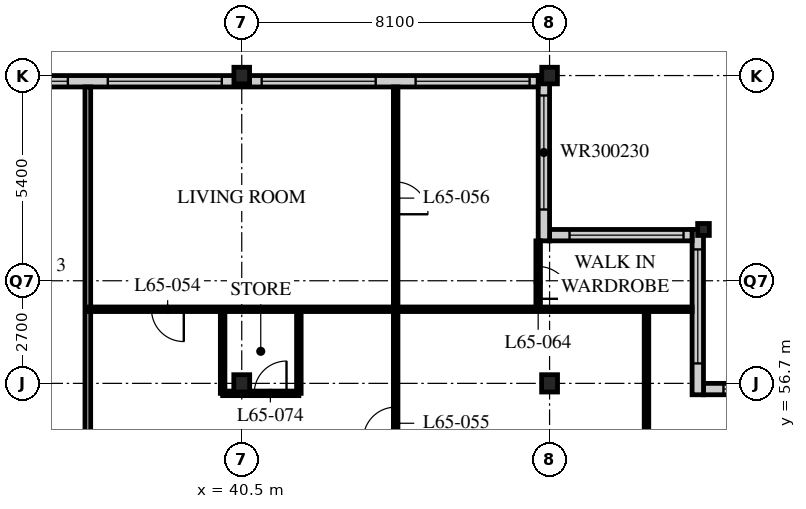
"""IFC4 building model, lengths in metres.
Left out: names, types, materials, properties, quantities, classifications, styles, units other than length and angle.
Written with IfcOpenShell. Run it as: python <this file> out.ifc"""

import sys

from ifc_helpers import new_model, si_unit, direction, frame, frame_2d, origin, origin_2d, place, context, subcontext, project, spatial, rectangle, i_section, extrude, element, fill, save


model = new_model("IFC4")
c1 = context("Model", 3, precision=1e-05, world=origin(), true_north=direction((0.0, 1.0)))
c2 = subcontext(c1, "Body", "Model", "MODEL_VIEW")
j1 = project(units=[si_unit("LENGTHUNIT", "METRE"), si_unit("PLANEANGLEUNIT", "RADIAN")], contexts=[c1])
p1 = place(None, origin())
s1 = spatial("IfcSite", under=j1, at=p1, CompositionType="ELEMENT")
p2 = place(p1, origin())
s2 = spatial("IfcBuilding", under=s1, at=p2, CompositionType="ELEMENT")
p3 = place(p2, frame((0.0, 0.0, 254.1)))
s3 = spatial("IfcBuildingStorey", under=s2, at=p3, CompositionType="ELEMENT", Elevation=254.1)
p4 = place(p3, frame((40.5, 56.7, 0.0), z_axis=(0.0, 0.0, 1.0), x_axis=(1.0, 0.0, 0.0)))
e1 = element("IfcColumn", 1, at=p4, inside=s3, PredefinedType="COLUMN", context=c2, shape_type="SweptSolid", body=[
    extrude(i_section(OverallWidth=0.418, OverallDepth=0.456, WebThickness=0.042, FlangeThickness=0.067, FilletRadius=0.015, at=origin_2d()), origin(), (0.0, 0.0, 1.0), 3.9),
])
p5 = place(p3, frame((40.5, 64.8, 0.0), z_axis=(0.0, 0.0, 1.0), x_axis=(1.0, 0.0, 0.0)))
e2 = element("IfcColumn", 2, at=p5, inside=s3, PredefinedType="COLUMN", context=c2, shape_type="SweptSolid", body=[
    extrude(i_section(OverallWidth=0.412, OverallDepth=0.437, WebThickness=0.036, FlangeThickness=0.058, FilletRadius=0.015, at=origin_2d()), origin(), (0.0, 0.0, 1.0), 3.9),
])
p6 = place(p3, frame((48.6, 56.7, 0.0), z_axis=(0.0, 0.0, 1.0), x_axis=(1.0, 0.0, 0.0)))
e3 = element("IfcColumn", 3, at=p6, inside=s3, PredefinedType="COLUMN", context=c2, shape_type="SweptSolid", body=[
    extrude(i_section(OverallWidth=0.418, OverallDepth=0.456, WebThickness=0.042, FlangeThickness=0.067, FilletRadius=0.015, at=origin_2d()), origin(), (0.0, 0.0, 1.0), 3.9),
])
p7 = place(p3, frame((48.6, 64.8, 0.0), z_axis=(0.0, 0.0, 1.0), x_axis=(1.0, 0.0, 0.0)))
e4 = element("IfcColumn", 4, at=p7, inside=s3, PredefinedType="COLUMN", context=c2, shape_type="SweptSolid", body=[
    extrude(i_section(OverallWidth=0.412, OverallDepth=0.437, WebThickness=0.036, FlangeThickness=0.058, FilletRadius=0.015, at=origin_2d()), origin(), (0.0, 0.0, 1.0), 3.9),
])
p8 = place(p3, frame((52.65, 60.75, 0.0), z_axis=(0.0, 0.0, 1.0), x_axis=(1.0, 0.0, 0.0)))
e5 = element("IfcColumn", 5, at=p8, inside=s3, PredefinedType="COLUMN", context=c2, shape_type="SweptSolid", body=[
    extrude(i_section(OverallWidth=0.307, OverallDepth=0.314, WebThickness=0.012, FlangeThickness=0.019, FilletRadius=0.015, at=origin_2d()), origin(), (0.0, 0.0, 1.0), 3.9),
])
p9 = place(p3, frame((56.4, 56.55, 0.0), z_axis=(0.0, 0.0, 1.0), x_axis=(-1.0, 0.0, 0.0)))
e6 = element("IfcWall", 6, at=p9, inside=s3, PredefinedType="SOLIDWALL", context=c2, shape_type="SweptSolid", body=[
    extrude(rectangle(XDim=3.75, YDim=0.3, at=frame_2d((1.875, 0.0))), origin(), (0.0, 0.0, 1.0), 3.69),
])
p10 = place(p9, frame((0.225, 0.0, 0.6)))
e7 = element("IfcOpeningElement", 7, at=p10, cuts=e6, PredefinedType="OPENING", context=c2, shape_type="SweptSolid", body=[
    extrude(rectangle(XDim=3.0, YDim=2.3, at=frame_2d((1.5, 1.15))), frame((0.0, 0.16, 0.0), z_axis=(0.0, -1.0, 0.0), x_axis=(1.0, 0.0, 0.0)), (0.0, 0.0, 1.0), 0.32),
])
p11 = place(p3, frame((52.5, 56.4, 0.0), z_axis=(0.0, 0.0, 1.0), x_axis=(0.0, 1.0, 0.0)))
e8 = element("IfcWall", 8, at=p11, inside=s3, PredefinedType="SOLIDWALL", context=c2, shape_type="SweptSolid", body=[
    extrude(rectangle(XDim=4.35, YDim=0.3, at=frame_2d((2.175, 0.0))), origin(), (0.0, 0.0, 1.0), 3.69),
])
p12 = place(p11, frame((0.825, 0.0, 0.6)))
e9 = element("IfcOpeningElement", 9, at=p12, cuts=e8, PredefinedType="OPENING", context=c2, shape_type="SweptSolid", body=[
    extrude(rectangle(XDim=3.0, YDim=2.3, at=frame_2d((1.5, 1.15))), frame((0.0, 0.16, 0.0), z_axis=(0.0, -1.0, 0.0), x_axis=(1.0, 0.0, 0.0)), (0.0, 0.0, 1.0), 0.32),
])
p13 = place(p3, frame((52.35, 60.6, 0.0), z_axis=(0.0, 0.0, 1.0), x_axis=(-1.0, 0.0, 0.0)))
e10 = element("IfcWall", 10, at=p13, inside=s3, PredefinedType="SOLIDWALL", context=c2, shape_type="SweptSolid", body=[
    extrude(rectangle(XDim=3.75, YDim=0.3, at=frame_2d((1.875, 0.0))), origin(), (0.0, 0.0, 1.0), 3.69),
])
p14 = place(p13, frame((0.225, 0.0, 0.6)))
e11 = element("IfcOpeningElement", 11, at=p14, cuts=e10, PredefinedType="OPENING", context=c2, shape_type="SweptSolid", body=[
    extrude(rectangle(XDim=3.0, YDim=2.3, at=frame_2d((1.5, 1.15))), frame((0.0, 0.16, 0.0), z_axis=(0.0, -1.0, 0.0), x_axis=(1.0, 0.0, 0.0)), (0.0, 0.0, 1.0), 0.32),
])
p15 = place(p3, frame((48.45, 60.45, 0.0), z_axis=(0.0, 0.0, 1.0), x_axis=(0.0, 1.0, 0.0)))
e12 = element("IfcWall", 12, at=p15, inside=s3, PredefinedType="SOLIDWALL", context=c2, shape_type="SweptSolid", body=[
    extrude(rectangle(XDim=4.35, YDim=0.3, at=frame_2d((2.175, 0.0))), origin(), (0.0, 0.0, 1.0), 3.69),
])
p16 = place(p15, frame((0.825, 0.0, 0.6)))
e13 = element("IfcOpeningElement", 13, at=p16, cuts=e12, PredefinedType="OPENING", context=c2, shape_type="SweptSolid", body=[
    extrude(rectangle(XDim=3.0, YDim=2.3, at=frame_2d((1.5, 1.15))), frame((0.0, 0.16, 0.0), z_axis=(0.0, -1.0, 0.0), x_axis=(1.0, 0.0, 0.0)), (0.0, 0.0, 1.0), 0.32),
])
p17 = place(p3, frame((48.3, 64.65, 0.0), z_axis=(0.0, 0.0, 1.0), x_axis=(-1.0, 0.0, 0.0)))
e14 = element("IfcWall", 14, at=p17, inside=s3, PredefinedType="SOLIDWALL", context=c2, shape_type="SweptSolid", body=[
    extrude(rectangle(XDim=40.2, YDim=0.3, at=frame_2d((20.1, 0.0))), origin(), (0.0, 0.0, 1.0), 3.69),
])
p18 = place(p17, frame((0.225, 0.0, 0.6)))
e15 = element("IfcOpeningElement", 15, at=p18, cuts=e14, PredefinedType="OPENING", context=c2, shape_type="SweptSolid", body=[
    extrude(rectangle(XDim=3.0, YDim=2.4, at=frame_2d((1.5, 1.2))), frame((0.0, 0.16, 0.0), z_axis=(0.0, -1.0, 0.0), x_axis=(1.0, 0.0, 0.0)), (0.0, 0.0, 1.0), 0.32),
])
p19 = place(p17, frame((4.275, 0.0, 0.6)))
e16 = element("IfcOpeningElement", 16, at=p19, cuts=e14, PredefinedType="OPENING", context=c2, shape_type="SweptSolid", body=[
    extrude(rectangle(XDim=3.0, YDim=2.4, at=frame_2d((1.5, 1.2))), frame((0.0, 0.16, 0.0), z_axis=(0.0, -1.0, 0.0), x_axis=(1.0, 0.0, 0.0)), (0.0, 0.0, 1.0), 0.32),
])
p20 = place(p17, frame((8.325, 0.0, 0.6)))
e17 = element("IfcOpeningElement", 17, at=p20, cuts=e14, PredefinedType="OPENING", context=c2, shape_type="SweptSolid", body=[
    extrude(rectangle(XDim=3.0, YDim=2.4, at=frame_2d((1.5, 1.2))), frame((0.0, 0.16, 0.0), z_axis=(0.0, -1.0, 0.0), x_axis=(1.0, 0.0, 0.0)), (0.0, 0.0, 1.0), 0.32),
])
p21 = place(p17, frame((12.375, 0.0, 0.6)))
e18 = element("IfcOpeningElement", 18, at=p21, cuts=e14, PredefinedType="OPENING", context=c2, shape_type="SweptSolid", body=[
    extrude(rectangle(XDim=3.0, YDim=2.4, at=frame_2d((1.5, 1.2))), frame((0.0, 0.16, 0.0), z_axis=(0.0, -1.0, 0.0), x_axis=(1.0, 0.0, 0.0)), (0.0, 0.0, 1.0), 0.32),
])
p22 = place(p17, frame((16.425, 0.0, 0.6)))
e19 = element("IfcOpeningElement", 19, at=p22, cuts=e14, PredefinedType="OPENING", context=c2, shape_type="SweptSolid", body=[
    extrude(rectangle(XDim=3.0, YDim=2.4, at=frame_2d((1.5, 1.2))), frame((0.0, 0.16, 0.0), z_axis=(0.0, -1.0, 0.0), x_axis=(1.0, 0.0, 0.0)), (0.0, 0.0, 1.0), 0.32),
])
p23 = place(p17, frame((20.475, 0.0, 0.6)))
e20 = element("IfcOpeningElement", 20, at=p23, cuts=e14, PredefinedType="OPENING", context=c2, shape_type="SweptSolid", body=[
    extrude(rectangle(XDim=3.0, YDim=2.4, at=frame_2d((1.5, 1.2))), frame((0.0, 0.16, 0.0), z_axis=(0.0, -1.0, 0.0), x_axis=(1.0, 0.0, 0.0)), (0.0, 0.0, 1.0), 0.32),
])
p24 = place(p17, frame((24.525, 0.0, 0.6)))
e21 = element("IfcOpeningElement", 21, at=p24, cuts=e14, PredefinedType="OPENING", context=c2, shape_type="SweptSolid", body=[
    extrude(rectangle(XDim=3.0, YDim=2.4, at=frame_2d((1.5, 1.2))), frame((0.0, 0.16, 0.0), z_axis=(0.0, -1.0, 0.0), x_axis=(1.0, 0.0, 0.0)), (0.0, 0.0, 1.0), 0.32),
])
p25 = place(p17, frame((28.575, 0.0, 0.6)))
e22 = element("IfcOpeningElement", 22, at=p25, cuts=e14, PredefinedType="OPENING", context=c2, shape_type="SweptSolid", body=[
    extrude(rectangle(XDim=3.0, YDim=2.4, at=frame_2d((1.5, 1.2))), frame((0.0, 0.16, 0.0), z_axis=(0.0, -1.0, 0.0), x_axis=(1.0, 0.0, 0.0)), (0.0, 0.0, 1.0), 0.32),
])
p26 = place(p17, frame((32.625, 0.0, 0.6)))
e23 = element("IfcOpeningElement", 23, at=p26, cuts=e14, PredefinedType="OPENING", context=c2, shape_type="SweptSolid", body=[
    extrude(rectangle(XDim=3.0, YDim=2.4, at=frame_2d((1.5, 1.2))), frame((0.0, 0.16, 0.0), z_axis=(0.0, -1.0, 0.0), x_axis=(1.0, 0.0, 0.0)), (0.0, 0.0, 1.0), 0.32),
])
p27 = place(p17, frame((36.675, 0.0, 0.6)))
e24 = element("IfcOpeningElement", 24, at=p27, cuts=e14, PredefinedType="OPENING", context=c2, shape_type="SweptSolid", body=[
    extrude(rectangle(XDim=3.0, YDim=2.4, at=frame_2d((1.5, 1.2))), frame((0.0, 0.16, 0.0), z_axis=(0.0, -1.0, 0.0), x_axis=(1.0, 0.0, 0.0)), (0.0, 0.0, 1.0), 0.32),
])
p28 = place(p3, frame((36.45, 64.5, 0.0), z_axis=(0.0, 0.0, 1.0), x_axis=(0.0, -1.0, 0.0)))
e25 = element("IfcWall", 25, at=p28, inside=s3, PredefinedType="PARTITIONING", context=c2, shape_type="SweptSolid", body=[
    extrude(rectangle(XDim=11.85, YDim=0.15, at=frame_2d((5.925, 0.0))), origin(), (0.0, 0.0, 1.0), 3.69),
])
p29 = place(p3, frame((36.45, 58.65, 0.0), z_axis=(0.0, 0.0, 1.0), x_axis=(1.0, 0.0, 0.0)))
e26 = element("IfcWall", 26, at=p29, inside=s3, PredefinedType="PARTITIONING", context=c2, shape_type="SweptSolid", body=[
    extrude(rectangle(XDim=15.9, YDim=0.12, at=frame_2d((7.95, 0.0))), origin(), (0.0, 0.0, 1.0), 3.69),
])
p30 = place(p29, frame((1.675, 0.0, 0.0)))
e27 = element("IfcOpeningElement", 27, at=p30, cuts=e26, PredefinedType="OPENING", context=c2, shape_type="SweptSolid", body=[
    extrude(rectangle(XDim=0.85, YDim=2.1, at=frame_2d((0.425, 1.05))), frame((0.0, 0.07, 0.0), z_axis=(0.0, -1.0, 0.0), x_axis=(1.0, 0.0, 0.0)), (0.0, 0.0, 1.0), 0.14),
])
p31 = place(p3, frame((44.55, 64.5, 0.0), z_axis=(0.0, 0.0, 1.0), x_axis=(0.0, -1.0, 0.0)))
e28 = element("IfcWall", 28, at=p31, inside=s3, PredefinedType="PARTITIONING", context=c2, shape_type="SweptSolid", body=[
    extrude(rectangle(XDim=13.65, YDim=0.12, at=frame_2d((6.825, 0.0))), origin(), (0.0, 0.0, 1.0), 3.69),
])
p32 = place(p31, frame((8.425, 0.0, 0.0)))
e29 = element("IfcOpeningElement", 29, at=p32, cuts=e28, PredefinedType="OPENING", context=c2, shape_type="SweptSolid", body=[
    extrude(rectangle(XDim=0.85, YDim=2.1, at=frame_2d((0.425, 1.05))), frame((0.0, 0.07, 0.0), z_axis=(0.0, -1.0, 0.0), x_axis=(1.0, 0.0, 0.0)), (0.0, 0.0, 1.0), 0.14),
])
p33 = place(p31, frame((2.5, 0.0, 0.0)))
e30 = element("IfcOpeningElement", 30, at=p33, cuts=e28, PredefinedType="OPENING", context=c2, shape_type="SweptSolid", body=[
    extrude(rectangle(XDim=0.85, YDim=2.1, at=frame_2d((0.425, 1.05))), frame((0.0, 0.07, 0.0), z_axis=(0.0, -1.0, 0.0), x_axis=(1.0, 0.0, 0.0)), (0.0, 0.0, 1.0), 0.14),
])
p34 = place(p3, frame((48.3, 58.65, 0.0), z_axis=(0.0, 0.0, 1.0), x_axis=(0.0, 1.0, 0.0)))
e31 = element("IfcWall", 31, at=p34, inside=s3, PredefinedType="PARTITIONING", context=c2, shape_type="SweptSolid", body=[
    extrude(rectangle(XDim=1.8, YDim=0.12, at=frame_2d((0.9, 0.0))), origin(), (0.0, 0.0, 1.0), 3.69),
])
p35 = place(p34, frame((0.275, 0.0, 0.0)))
e32 = element("IfcOpeningElement", 32, at=p35, cuts=e31, PredefinedType="OPENING", context=c2, shape_type="SweptSolid", body=[
    extrude(rectangle(XDim=0.85, YDim=2.1, at=frame_2d((0.425, 1.05))), frame((0.0, 0.07, 0.0), z_axis=(0.0, -1.0, 0.0), x_axis=(1.0, 0.0, 0.0)), (0.0, 0.0, 1.0), 0.14),
])
p36 = place(p3, frame((51.15, 50.85, 0.0), z_axis=(0.0, 0.0, 1.0), x_axis=(0.0, 1.0, 0.0)))
e33 = element("IfcWall", 33, at=p36, inside=s3, PredefinedType="PARTITIONING", context=c2, shape_type="SweptSolid", body=[
    extrude(rectangle(XDim=7.8, YDim=0.12, at=frame_2d((3.9, 0.0))), origin(), (0.0, 0.0, 1.0), 3.69),
])
p37 = place(p36, frame((3.475, 0.0, 0.0)))
e34 = element("IfcOpeningElement", 34, at=p37, cuts=e33, PredefinedType="OPENING", context=c2, shape_type="SweptSolid", body=[
    extrude(rectangle(XDim=0.85, YDim=2.1, at=frame_2d((0.425, 1.05))), frame((0.0, 0.07, 0.0), z_axis=(0.0, -1.0, 0.0), x_axis=(1.0, 0.0, 0.0)), (0.0, 0.0, 1.0), 0.14),
])
for number, where, z_axis, x_axis in (
    (35, (39.997, 58.65, 0.0), (0.0, 0.0, 1.0), (0.0, -1.0, 0.0)),
    (36, (42.003, 58.65, 0.0), (0.0, 0.0, 1.0), (0.0, -1.0, 0.0)),
):
    element("IfcWall", number, at=place(p3, frame(where, z_axis=z_axis, x_axis=x_axis)), inside=s3, PredefinedType="PARTITIONING", context=c2, shape_type="SweptSolid", body=[
        extrude(rectangle(XDim=2.213, YDim=0.12, at=frame_2d((1.106, 0.0))), origin(), (0.0, 0.0, 1.0), 3.69),
    ])
p38 = place(p3, frame((39.997, 56.437, 0.0), z_axis=(0.0, 0.0, 1.0), x_axis=(1.0, 0.0, 0.0)))
e37 = element("IfcWall", 37, at=p38, inside=s3, PredefinedType="PARTITIONING", context=c2, shape_type="SweptSolid", body=[
    extrude(rectangle(XDim=2.006, YDim=0.12, at=frame_2d((1.003, 0.0))), origin(), (0.0, 0.0, 1.0), 3.69),
])
p39 = place(p38, frame((0.831, 0.0, 0.0)))
e38 = element("IfcOpeningElement", 38, at=p39, cuts=e37, PredefinedType="OPENING", context=c2, shape_type="SweptSolid", body=[
    extrude(rectangle(XDim=0.85, YDim=2.1, at=frame_2d((0.425, 1.05))), frame((0.0, 0.07, 0.0), z_axis=(0.0, -1.0, 0.0), x_axis=(1.0, 0.0, 0.0)), (0.0, 0.0, 1.0), 0.14),
])
p40 = place(p10, origin())
e39 = element("IfcWindow", 39, at=p40, inside=s3, PartitioningType="SINGLE_PANEL", PredefinedType="WINDOW", context=c2, shape_type="SweptSolid", body=[
    extrude(rectangle(XDim=3.0, YDim=2.3, at=frame_2d((1.5, 1.15))), frame((0.0, 0.03, 0.0), z_axis=(0.0, -1.0, 0.0), x_axis=(1.0, 0.0, 0.0)), (0.0, 0.0, 1.0), 0.06),
])
fill(e7, e39)
p41 = place(p12, origin())
e40 = element("IfcWindow", 40, at=p41, inside=s3, PartitioningType="SINGLE_PANEL", PredefinedType="WINDOW", context=c2, shape_type="SweptSolid", body=[
    extrude(rectangle(XDim=3.0, YDim=2.3, at=frame_2d((1.5, 1.15))), frame((0.0, 0.03, 0.0), z_axis=(0.0, -1.0, 0.0), x_axis=(1.0, 0.0, 0.0)), (0.0, 0.0, 1.0), 0.06),
])
fill(e9, e40)
p42 = place(p14, origin())
e41 = element("IfcWindow", 41, at=p42, inside=s3, PartitioningType="SINGLE_PANEL", PredefinedType="WINDOW", context=c2, shape_type="SweptSolid", body=[
    extrude(rectangle(XDim=3.0, YDim=2.3, at=frame_2d((1.5, 1.15))), frame((0.0, 0.03, 0.0), z_axis=(0.0, -1.0, 0.0), x_axis=(1.0, 0.0, 0.0)), (0.0, 0.0, 1.0), 0.06),
])
fill(e11, e41)
p43 = place(p16, origin())
e42 = element("IfcWindow", 42, at=p43, inside=s3, PartitioningType="SINGLE_PANEL", PredefinedType="WINDOW", context=c2, shape_type="SweptSolid", body=[
    extrude(rectangle(XDim=3.0, YDim=2.3, at=frame_2d((1.5, 1.15))), frame((0.0, 0.03, 0.0), z_axis=(0.0, -1.0, 0.0), x_axis=(1.0, 0.0, 0.0)), (0.0, 0.0, 1.0), 0.06),
])
fill(e13, e42)
p44 = place(p18, origin())
e43 = element("IfcWindow", 43, at=p44, inside=s3, PartitioningType="SINGLE_PANEL", PredefinedType="WINDOW", context=c2, shape_type="SweptSolid", body=[
    extrude(rectangle(XDim=3.0, YDim=2.4, at=frame_2d((1.5, 1.2))), frame((0.0, 0.03, 0.0), z_axis=(0.0, -1.0, 0.0), x_axis=(1.0, 0.0, 0.0)), (0.0, 0.0, 1.0), 0.06),
])
fill(e15, e43)
p45 = place(p19, origin())
e44 = element("IfcWindow", 44, at=p45, inside=s3, PartitioningType="SINGLE_PANEL", PredefinedType="WINDOW", context=c2, shape_type="SweptSolid", body=[
    extrude(rectangle(XDim=3.0, YDim=2.4, at=frame_2d((1.5, 1.2))), frame((0.0, 0.03, 0.0), z_axis=(0.0, -1.0, 0.0), x_axis=(1.0, 0.0, 0.0)), (0.0, 0.0, 1.0), 0.06),
])
fill(e16, e44)
p46 = place(p20, origin())
e45 = element("IfcWindow", 45, at=p46, inside=s3, PartitioningType="SINGLE_PANEL", PredefinedType="WINDOW", context=c2, shape_type="SweptSolid", body=[
    extrude(rectangle(XDim=3.0, YDim=2.4, at=frame_2d((1.5, 1.2))), frame((0.0, 0.03, 0.0), z_axis=(0.0, -1.0, 0.0), x_axis=(1.0, 0.0, 0.0)), (0.0, 0.0, 1.0), 0.06),
])
fill(e17, e45)
p47 = place(p21, origin())
e46 = element("IfcWindow", 46, at=p47, inside=s3, PartitioningType="SINGLE_PANEL", PredefinedType="WINDOW", context=c2, shape_type="SweptSolid", body=[
    extrude(rectangle(XDim=3.0, YDim=2.4, at=frame_2d((1.5, 1.2))), frame((0.0, 0.03, 0.0), z_axis=(0.0, -1.0, 0.0), x_axis=(1.0, 0.0, 0.0)), (0.0, 0.0, 1.0), 0.06),
])
fill(e18, e46)
p48 = place(p30, origin())
e47 = element("IfcDoor", 47, at=p48, inside=s3, OperationType="SINGLE_SWING_LEFT", PredefinedType="DOOR", context=c2, shape_type="SweptSolid", body=[
    extrude(rectangle(XDim=0.85, YDim=2.1, at=frame_2d((0.425, 1.05))), frame((0.0, 0.025, 0.0), z_axis=(0.0, -1.0, 0.0), x_axis=(1.0, 0.0, 0.0)), (0.0, 0.0, 1.0), 0.05),
])
fill(e27, e47)
p49 = place(p32, origin())
e48 = element("IfcDoor", 48, at=p49, inside=s3, OperationType="SINGLE_SWING_LEFT", PredefinedType="DOOR", context=c2, shape_type="SweptSolid", body=[
    extrude(rectangle(XDim=0.85, YDim=2.1, at=frame_2d((0.425, 1.05))), frame((0.0, 0.025, 0.0), z_axis=(0.0, -1.0, 0.0), x_axis=(1.0, 0.0, 0.0)), (0.0, 0.0, 1.0), 0.05),
])
fill(e29, e48)
p50 = place(p33, origin())
e49 = element("IfcDoor", 49, at=p50, inside=s3, OperationType="SINGLE_SWING_RIGHT", PredefinedType="DOOR", context=c2, shape_type="SweptSolid", body=[
    extrude(rectangle(XDim=0.85, YDim=2.1, at=frame_2d((0.425, 1.05))), frame((0.0, 0.025, 0.0), z_axis=(0.0, -1.0, 0.0), x_axis=(1.0, 0.0, 0.0)), (0.0, 0.0, 1.0), 0.05),
])
fill(e30, e49)
p51 = place(p35, origin())
e50 = element("IfcDoor", 50, at=p51, inside=s3, OperationType="SINGLE_SWING_RIGHT", PredefinedType="DOOR", context=c2, shape_type="SweptSolid", body=[
    extrude(rectangle(XDim=0.85, YDim=2.1, at=frame_2d((0.425, 1.05))), frame((0.0, 0.025, 0.0), z_axis=(0.0, -1.0, 0.0), x_axis=(1.0, 0.0, 0.0)), (0.0, 0.0, 1.0), 0.05),
])
fill(e32, e50)
p52 = place(p39, origin())
e51 = element("IfcDoor", 51, at=p52, inside=s3, OperationType="SINGLE_SWING_RIGHT", PredefinedType="DOOR", context=c2, shape_type="SweptSolid", body=[
    extrude(rectangle(XDim=0.85, YDim=2.1, at=frame_2d((0.425, 1.05))), frame((0.0, 0.025, 0.0), z_axis=(0.0, -1.0, 0.0), x_axis=(1.0, 0.0, 0.0)), (0.0, 0.0, 1.0), 0.05),
])
fill(e38, e51)
save(model, sys.argv[1])
